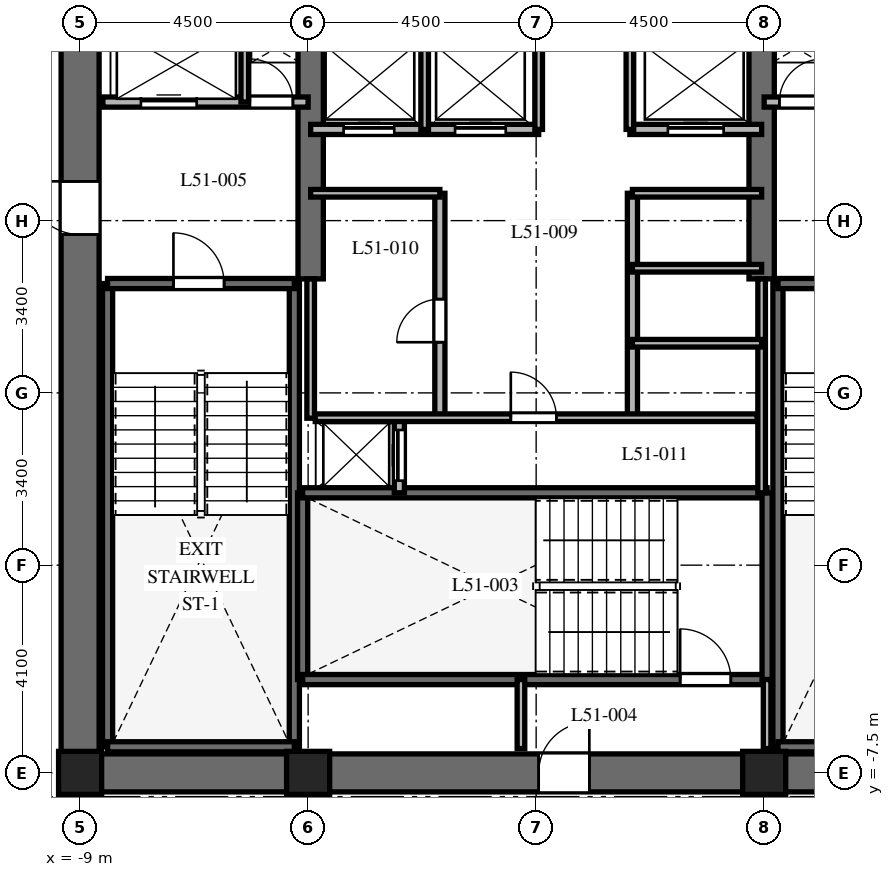
"""IFC4 building model, lengths in metres.
Left out: names, types, materials, properties, quantities, classifications, styles, units other than length and angle.
Written with IfcOpenShell. Run it as: python <this file> out.ifc"""

import sys

from ifc_helpers import new_model, si_unit, direction, frame, frame_2d, origin, origin_2d, place, context, subcontext, project, spatial, rectangle, extrude, element, fill, save


model = new_model("IFC4")
c1 = context("Model", 3, precision=1e-05, world=origin(), true_north=direction((0.0, 1.0)))
c2 = subcontext(c1, "Body", "Model", "MODEL_VIEW")
j1 = project(units=[si_unit("LENGTHUNIT", "METRE"), si_unit("PLANEANGLEUNIT", "RADIAN")], contexts=[c1])
p1 = place(None, origin())
s1 = spatial("IfcSite", under=j1, at=p1, CompositionType="ELEMENT")
p2 = place(p1, origin())
s2 = spatial("IfcBuilding", under=s1, at=p2, CompositionType="ELEMENT")
p3 = place(p2, frame((0.0, 0.0, 206.5)))
s3 = spatial("IfcBuildingStorey", under=s2, at=p3, CompositionType="ELEMENT", Elevation=206.5)
p4 = place(p3, frame((-9.375, -7.5, 0.0), z_axis=(0.0, 0.0, 1.0), x_axis=(1.0, 0.0, 0.0)))
e1 = element("IfcWall", 1, at=p4, inside=s3, PredefinedType="SHEAR", context=c2, shape_type="SweptSolid", body=[
    extrude(rectangle(XDim=18.75, YDim=0.75, at=frame_2d((9.375, 0.0))), origin(), (0.0, 0.0, 1.0), 3.8),
])
p5 = place(p4, frame((9.425, 0.0, 0.0)))
e2 = element("IfcOpeningElement", 2, at=p5, cuts=e1, PredefinedType="OPENING", context=c2, shape_type="SweptSolid", body=[
    extrude(rectangle(XDim=1.0, YDim=2.15, at=frame_2d((0.5, 1.075))), frame((0.0, 0.385, 0.0), z_axis=(0.0, -1.0, 0.0), x_axis=(1.0, 0.0, 0.0)), (0.0, 0.0, 1.0), 0.77),
])
p6 = place(p3, frame((-9.0, -7.125, 0.0), z_axis=(0.0, 0.0, 1.0), x_axis=(0.0, 1.0, 0.0)))
e3 = element("IfcWall", 3, at=p6, inside=s3, PredefinedType="SHEAR", context=c2, shape_type="SweptSolid", body=[
    extrude(rectangle(XDim=14.25, YDim=0.75, at=frame_2d((7.125, 0.0))), origin(), (0.0, 0.0, 1.0), 3.8),
])
p7 = place(p6, frame((10.25, 0.0, 0.0)))
e4 = element("IfcOpeningElement", 4, at=p7, cuts=e3, PredefinedType="OPENING", context=c2, shape_type="SweptSolid", body=[
    extrude(rectangle(XDim=1.05, YDim=2.15, at=frame_2d((0.525, 1.075))), frame((0.0, 0.385, 0.0), z_axis=(0.0, -1.0, 0.0), x_axis=(1.0, 0.0, 0.0)), (0.0, 0.0, 1.0), 0.77),
])
for number, where, z_axis, x_axis in (
    (5, (-4.45, 2.25, 0.0), (0.0, 0.0, 1.0), (0.0, 1.0, 0.0)),
    (6, (4.45, 2.25, 0.0), (0.0, 0.0, 1.0), (0.0, 1.0, 0.0)),
):
    element("IfcWall", number, at=place(p3, frame(where, z_axis=z_axis, x_axis=x_axis)), inside=s3, PredefinedType="SHEAR", context=c2, shape_type="SweptSolid", body=[
        extrude(rectangle(XDim=4.875, YDim=0.5, at=frame_2d((2.438, 0.0))), origin(), (0.0, 0.0, 1.0), 3.8),
    ])
for number, where, z_axis, x_axis in (
    (7, (-8.458, -6.985, 0.0), (0.0, 0.0, 1.0), (0.0, 1.0, 0.0)),
    (8, (-4.772, -6.985, 0.0), (0.0, 0.0, 1.0), (0.0, 1.0, 0.0)),
):
    element("IfcWall", number, at=place(p3, frame(where, z_axis=z_axis, x_axis=x_axis)), inside=s3, PredefinedType="SHEAR", context=c2, shape_type="SweptSolid", body=[
        extrude(rectangle(XDim=9.143, YDim=0.2, at=frame_2d((4.572, 0.0))), origin(), (0.0, 0.0, 1.0), 3.8),
    ])
p8 = place(p3, frame((-8.458, -6.985, 0.0), z_axis=(0.0, 0.0, 1.0), x_axis=(1.0, 0.0, 0.0)))
e9 = element("IfcWall", 9, at=p8, inside=s3, PredefinedType="SHEAR", context=c2, shape_type="SweptSolid", body=[
    extrude(rectangle(XDim=3.686, YDim=0.2, at=frame_2d((1.843, 0.0))), origin(), (0.0, 0.0, 1.0), 3.8),
])
p9 = place(p3, frame((-8.458, 2.158, 0.0), z_axis=(0.0, 0.0, 1.0), x_axis=(1.0, 0.0, 0.0)))
e10 = element("IfcWall", 10, at=p9, inside=s3, PredefinedType="SHEAR", context=c2, shape_type="SweptSolid", body=[
    extrude(rectangle(XDim=3.686, YDim=0.2, at=frame_2d((1.843, 0.0))), origin(), (0.0, 0.0, 1.0), 3.8),
])
p10 = place(p9, frame((1.3, 0.0, 0.0)))
e11 = element("IfcOpeningElement", 11, at=p10, cuts=e10, PredefinedType="OPENING", context=c2, shape_type="SweptSolid", body=[
    extrude(rectangle(XDim=1.0, YDim=2.15, at=frame_2d((0.5, 1.075))), frame((0.0, 0.11, 0.0), z_axis=(0.0, -1.0, 0.0), x_axis=(1.0, 0.0, 0.0)), (0.0, 0.0, 1.0), 0.22),
])
p11 = place(p3, frame((4.772, -6.985, 0.0), z_axis=(0.0, 0.0, 1.0), x_axis=(0.0, 1.0, 0.0)))
e12 = element("IfcWall", 12, at=p11, inside=s3, PredefinedType="SHEAR", context=c2, shape_type="SweptSolid", body=[
    extrude(rectangle(XDim=9.143, YDim=0.2, at=frame_2d((4.572, 0.0))), origin(), (0.0, 0.0, 1.0), 3.8),
])
p12 = place(p3, frame((4.772, -6.985, 0.0), z_axis=(0.0, 0.0, 1.0), x_axis=(1.0, 0.0, 0.0)))
e13 = element("IfcWall", 13, at=p12, inside=s3, PredefinedType="SHEAR", context=c2, shape_type="SweptSolid", body=[
    extrude(rectangle(XDim=3.686, YDim=0.2, at=frame_2d((1.843, 0.0))), origin(), (0.0, 0.0, 1.0), 3.8),
])
p13 = place(p3, frame((4.772, 2.158, 0.0), z_axis=(0.0, 0.0, 1.0), x_axis=(1.0, 0.0, 0.0)))
e14 = element("IfcWall", 14, at=p13, inside=s3, PredefinedType="SHEAR", context=c2, shape_type="SweptSolid", body=[
    extrude(rectangle(XDim=3.686, YDim=0.2, at=frame_2d((1.843, 0.0))), origin(), (0.0, 0.0, 1.0), 3.8),
])
p14 = place(p13, frame((1.35, 0.0, 0.0)))
e15 = element("IfcOpeningElement", 15, at=p14, cuts=e14, PredefinedType="OPENING", context=c2, shape_type="SweptSolid", body=[
    extrude(rectangle(XDim=1.0, YDim=2.15, at=frame_2d((0.5, 1.075))), frame((0.0, 0.11, 0.0), z_axis=(0.0, -1.0, 0.0), x_axis=(1.0, 0.0, 0.0)), (0.0, 0.0, 1.0), 0.22),
])
p15 = place(p3, frame((-4.608, -5.658, 0.0), z_axis=(0.0, 0.0, 1.0), x_axis=(0.0, 1.0, 0.0)))
e16 = element("IfcWall", 16, at=p15, inside=s3, PredefinedType="SHEAR", context=c2, shape_type="SweptSolid", body=[
    extrude(rectangle(XDim=3.686, YDim=0.2, at=frame_2d((1.843, 0.0))), origin(), (0.0, 0.0, 1.0), 3.8),
])
p16 = place(p3, frame((-4.608, -5.658, 0.0), z_axis=(0.0, 0.0, 1.0), x_axis=(1.0, 0.0, 0.0)))
e17 = element("IfcWall", 17, at=p16, inside=s3, PredefinedType="SHEAR", context=c2, shape_type="SweptSolid", body=[
    extrude(rectangle(XDim=9.166, YDim=0.2, at=frame_2d((4.583, 0.0))), origin(), (0.0, 0.0, 1.0), 3.8),
])
p17 = place(p16, frame((7.45, 0.0, 0.0)))
e18 = element("IfcOpeningElement", 18, at=p17, cuts=e17, PredefinedType="OPENING", context=c2, shape_type="SweptSolid", body=[
    extrude(rectangle(XDim=1.0, YDim=2.15, at=frame_2d((0.5, 1.075))), frame((0.0, 0.11, 0.0), z_axis=(0.0, -1.0, 0.0), x_axis=(1.0, 0.0, 0.0)), (0.0, 0.0, 1.0), 0.22),
])
p18 = place(p3, frame((-4.608, -1.972, 0.0), z_axis=(0.0, 0.0, 1.0), x_axis=(1.0, 0.0, 0.0)))
e19 = element("IfcWall", 19, at=p18, inside=s3, PredefinedType="SHEAR", context=c2, shape_type="SweptSolid", body=[
    extrude(rectangle(XDim=9.166, YDim=0.2, at=frame_2d((4.583, 0.0))), origin(), (0.0, 0.0, 1.0), 3.8),
])
p19 = place(p3, frame((4.558, -5.658, 0.0), z_axis=(0.0, 0.0, 1.0), x_axis=(0.0, 1.0, 0.0)))
e20 = element("IfcWall", 20, at=p19, inside=s3, PredefinedType="SHEAR", context=c2, shape_type="SweptSolid", body=[
    extrude(rectangle(XDim=3.686, YDim=0.2, at=frame_2d((1.843, 0.0))), origin(), (0.0, 0.0, 1.0), 3.8),
])
for number, where, z_axis, x_axis in (
    (21, (-9.0, -7.5, 0.0), (0.0, 0.0, 1.0), (1.0, 0.0, 0.0)),
    (22, (-4.5, -7.5, 0.0), (0.0, 0.0, 1.0), (1.0, 0.0, 0.0)),
    (23, (4.5, -7.5, 0.0), (0.0, 0.0, 1.0), (1.0, 0.0, 0.0)),
):
    element("IfcColumn", number, at=place(p3, frame(where, z_axis=z_axis, x_axis=x_axis)), inside=s3, PredefinedType="COLUMN", context=c2, shape_type="SweptSolid", body=[
        extrude(rectangle(XDim=0.85, YDim=0.85, at=origin_2d()), origin(), (0.0, 0.0, 1.0), 3.8),
    ])
for number, where, z_axis, x_axis in (
    (24, (-0.3, -7.02, 0.0), (0.0, 0.0, 1.0), (0.0, 1.0, 0.0)),
    (25, (4.558, -7.02, 0.0), (0.0, 0.0, 1.0), (0.0, 1.0, 0.0)),
):
    element("IfcWall", number, at=place(p3, frame(where, z_axis=z_axis, x_axis=x_axis)), inside=s3, PredefinedType="PARTITIONING", context=c2, shape_type="SweptSolid", body=[
        extrude(rectangle(XDim=1.362, YDim=0.15, at=frame_2d((0.681, 0.0))), origin(), (0.0, 0.0, 1.0), 3.5),
    ])
p20 = place(p3, frame((-8.55, 5.74, 0.0), z_axis=(0.0, 0.0, 1.0), x_axis=(1.0, 0.0, 0.0)))
e26 = element("IfcWall", 26, at=p20, inside=s3, PredefinedType="PARTITIONING", context=c2, shape_type="SweptSolid", body=[
    extrude(rectangle(XDim=4.05, YDim=0.2, at=frame_2d((2.025, 0.0))), origin(), (0.0, 0.0, 1.0), 3.5),
])
p21 = place(p20, frame((0.75, 0.0, 0.0)))
e27 = element("IfcOpeningElement", 27, at=p21, cuts=e26, PredefinedType="OPENING", context=c2, shape_type="SweptSolid", body=[
    extrude(rectangle(XDim=1.1, YDim=2.2, at=frame_2d((0.55, 1.1))), frame((0.0, 0.11, 0.0), z_axis=(0.0, -1.0, 0.0), x_axis=(1.0, 0.0, 0.0)), (0.0, 0.0, 1.0), 0.22),
])
p22 = place(p20, frame((2.9, 0.0, 0.0)))
e28 = element("IfcOpeningElement", 28, at=p22, cuts=e26, PredefinedType="OPENING", context=c2, shape_type="SweptSolid", body=[
    extrude(rectangle(XDim=0.85, YDim=2.03, at=frame_2d((0.425, 1.015))), frame((0.0, 0.11, 0.0), z_axis=(0.0, -1.0, 0.0), x_axis=(1.0, 0.0, 0.0)), (0.0, 0.0, 1.0), 0.22),
])
p23 = place(p3, frame((-5.75, 5.74, 0.0), z_axis=(0.0, 0.0, 1.0), x_axis=(0.0, 1.0, 0.0)))
e29 = element("IfcWall", 29, at=p23, inside=s3, PredefinedType="PARTITIONING", context=c2, shape_type="SweptSolid", body=[
    extrude(rectangle(XDim=1.41, YDim=0.15, at=frame_2d((0.705, 0.0))), origin(), (0.0, 0.0, 1.0), 3.5),
])
p24 = place(p3, frame((4.5, 5.74, 0.0), z_axis=(0.0, 0.0, 1.0), x_axis=(1.0, 0.0, 0.0)))
e30 = element("IfcWall", 30, at=p24, inside=s3, PredefinedType="PARTITIONING", context=c2, shape_type="SweptSolid", body=[
    extrude(rectangle(XDim=4.05, YDim=0.2, at=frame_2d((2.025, 0.0))), origin(), (0.0, 0.0, 1.0), 3.5),
])
p25 = place(p24, frame((0.3, 0.0, 0.0)))
e31 = element("IfcOpeningElement", 31, at=p25, cuts=e30, PredefinedType="OPENING", context=c2, shape_type="SweptSolid", body=[
    extrude(rectangle(XDim=0.85, YDim=2.03, at=frame_2d((0.425, 1.015))), frame((0.0, 0.11, 0.0), z_axis=(0.0, -1.0, 0.0), x_axis=(1.0, 0.0, 0.0)), (0.0, 0.0, 1.0), 0.22),
])
p26 = place(p24, frame((2.15, 0.0, 0.0)))
e32 = element("IfcOpeningElement", 32, at=p26, cuts=e30, PredefinedType="OPENING", context=c2, shape_type="SweptSolid", body=[
    extrude(rectangle(XDim=1.1, YDim=2.2, at=frame_2d((0.55, 1.1))), frame((0.0, 0.11, 0.0), z_axis=(0.0, -1.0, 0.0), x_axis=(1.0, 0.0, 0.0)), (0.0, 0.0, 1.0), 0.22),
])
p27 = place(p3, frame((-2.7, -1.972, 0.0), z_axis=(0.0, 0.0, 1.0), x_axis=(0.0, 1.0, 0.0)))
e33 = element("IfcWall", 33, at=p27, inside=s3, PredefinedType="PARTITIONING", context=c2, shape_type="SweptSolid", body=[
    extrude(rectangle(XDim=1.472, YDim=0.2, at=frame_2d((0.736, 0.0))), origin(), (0.0, 0.0, 1.0), 3.5),
])
p28 = place(p27, frame((0.24, 0.0, 0.0)))
e34 = element("IfcOpeningElement", 34, at=p28, cuts=e33, PredefinedType="OPENING", context=c2, shape_type="SweptSolid", body=[
    extrude(rectangle(XDim=1.0, YDim=2.2, at=frame_2d((0.5, 1.1))), frame((0.0, 0.11, 0.0), z_axis=(0.0, -1.0, 0.0), x_axis=(1.0, 0.0, 0.0)), (0.0, 0.0, 1.0), 0.22),
])
p29 = place(p3, frame((-4.45, 5.2, 0.0), z_axis=(0.0, 0.0, 1.0), x_axis=(1.0, 0.0, 0.0)))
e35 = element("IfcWall", 35, at=p29, inside=s3, PredefinedType="PARTITIONING", context=c2, shape_type="SweptSolid", body=[
    extrude(rectangle(XDim=4.5, YDim=0.2, at=frame_2d((2.25, 0.0))), origin(), (0.0, 0.0, 1.0), 3.5),
])
p30 = place(p29, frame((0.65, 0.0, 0.0)))
e36 = element("IfcOpeningElement", 36, at=p30, cuts=e35, PredefinedType="OPENING", context=c2, shape_type="SweptSolid", body=[
    extrude(rectangle(XDim=1.0, YDim=2.2, at=frame_2d((0.5, 1.1))), frame((0.0, 0.11, 0.0), z_axis=(0.0, -1.0, 0.0), x_axis=(1.0, 0.0, 0.0)), (0.0, 0.0, 1.0), 0.22),
])
p31 = place(p29, frame((2.85, 0.0, 0.0)))
e37 = element("IfcOpeningElement", 37, at=p31, cuts=e35, PredefinedType="OPENING", context=c2, shape_type="SweptSolid", body=[
    extrude(rectangle(XDim=1.0, YDim=2.2, at=frame_2d((0.5, 1.1))), frame((0.0, 0.11, 0.0), z_axis=(0.0, -1.0, 0.0), x_axis=(1.0, 0.0, 0.0)), (0.0, 0.0, 1.0), 0.22),
])
p32 = place(p3, frame((1.85, 5.2, 0.0), z_axis=(0.0, 0.0, 1.0), x_axis=(1.0, 0.0, 0.0)))
e38 = element("IfcWall", 38, at=p32, inside=s3, PredefinedType="PARTITIONING", context=c2, shape_type="SweptSolid", body=[
    extrude(rectangle(XDim=2.6, YDim=0.2, at=frame_2d((1.3, 0.0))), origin(), (0.0, 0.0, 1.0), 3.5),
])
p33 = place(p32, frame((0.75, 0.0, 0.0)))
e39 = element("IfcOpeningElement", 39, at=p33, cuts=e38, PredefinedType="OPENING", context=c2, shape_type="SweptSolid", body=[
    extrude(rectangle(XDim=1.1, YDim=2.2, at=frame_2d((0.55, 1.1))), frame((0.0, 0.11, 0.0), z_axis=(0.0, -1.0, 0.0), x_axis=(1.0, 0.0, 0.0)), (0.0, 0.0, 1.0), 0.22),
])
p34 = place(p3, frame((-2.2, 5.2, 0.0), z_axis=(0.0, 0.0, 1.0), x_axis=(0.0, 1.0, 0.0)))
e40 = element("IfcWall", 40, at=p34, inside=s3, PredefinedType="PARTITIONING", context=c2, shape_type="SweptSolid", body=[
    extrude(rectangle(XDim=1.85, YDim=0.15, at=frame_2d((0.925, 0.0))), origin(), (0.0, 0.0, 1.0), 3.5),
])
for number, where, z_axis, x_axis in (
    (41, (0.05, 5.2, 0.0), (0.0, 0.0, 1.0), (0.0, 1.0, 0.0)),
    (42, (1.85, 5.2, 0.0), (0.0, 0.0, 1.0), (0.0, 1.0, 0.0)),
):
    element("IfcWall", number, at=place(p3, frame(where, z_axis=z_axis, x_axis=x_axis)), inside=s3, PredefinedType="PARTITIONING", context=c2, shape_type="SweptSolid", body=[
        extrude(rectangle(XDim=1.95, YDim=0.15, at=frame_2d((0.975, 0.0))), origin(), (0.0, 0.0, 1.0), 3.5),
    ])
p35 = place(p3, frame((-4.45, -0.5, 0.0), z_axis=(0.0, 0.0, 1.0), x_axis=(0.0, 1.0, 0.0)))
e43 = element("IfcWall", 43, at=p35, inside=s3, PredefinedType="PARTITIONING", context=c2, shape_type="SweptSolid", body=[
    extrude(rectangle(XDim=2.75, YDim=0.15, at=frame_2d((1.375, 0.0))), origin(), (0.0, 0.0, 1.0), 3.5),
])
p36 = place(p3, frame((4.45, -1.972, 0.0), z_axis=(0.0, 0.0, 1.0), x_axis=(0.0, 1.0, 0.0)))
e44 = element("IfcWall", 44, at=p36, inside=s3, PredefinedType="PARTITIONING", context=c2, shape_type="SweptSolid", body=[
    extrude(rectangle(XDim=4.222, YDim=0.15, at=frame_2d((2.111, 0.0))), origin(), (0.0, 0.0, 1.0), 3.5),
])
p37 = place(p3, frame((-1.9, -0.5, 0.0), z_axis=(0.0, 0.0, 1.0), x_axis=(0.0, 1.0, 0.0)))
e45 = element("IfcWall", 45, at=p37, inside=s3, PredefinedType="PARTITIONING", context=c2, shape_type="SweptSolid", body=[
    extrude(rectangle(XDim=4.44, YDim=0.2, at=frame_2d((2.22, 0.0))), origin(), (0.0, 0.0, 1.0), 3.5),
])
p38 = place(p37, frame((1.5, 0.0, 0.0)))
e46 = element("IfcOpeningElement", 46, at=p38, cuts=e45, PredefinedType="OPENING", context=c2, shape_type="SweptSolid", body=[
    extrude(rectangle(XDim=0.85, YDim=2.03, at=frame_2d((0.425, 1.015))), frame((0.0, 0.11, 0.0), z_axis=(0.0, -1.0, 0.0), x_axis=(1.0, 0.0, 0.0)), (0.0, 0.0, 1.0), 0.22),
])
p39 = place(p3, frame((-4.45, 3.94, 0.0), z_axis=(0.0, 0.0, 1.0), x_axis=(1.0, 0.0, 0.0)))
e47 = element("IfcWall", 47, at=p39, inside=s3, PredefinedType="PARTITIONING", context=c2, shape_type="SweptSolid", body=[
    extrude(rectangle(XDim=2.55, YDim=0.15, at=frame_2d((1.275, 0.0))), origin(), (0.0, 0.0, 1.0), 3.5),
])
p40 = place(p3, frame((1.9, -0.5, 0.0), z_axis=(0.0, 0.0, 1.0), x_axis=(0.0, 1.0, 0.0)))
e48 = element("IfcWall", 48, at=p40, inside=s3, PredefinedType="PARTITIONING", context=c2, shape_type="SweptSolid", body=[
    extrude(rectangle(XDim=4.44, YDim=0.2, at=frame_2d((2.22, 0.0))), origin(), (0.0, 0.0, 1.0), 3.5),
])
for number, where, z_axis, x_axis in (
    (49, (1.9, 3.94, 0.0), (0.0, 0.0, 1.0), (1.0, 0.0, 0.0)),
    (50, (1.9, 0.98, 0.0), (0.0, 0.0, 1.0), (1.0, 0.0, 0.0)),
    (51, (1.9, 2.46, 0.0), (0.0, 0.0, 1.0), (1.0, 0.0, 0.0)),
):
    element("IfcWall", number, at=place(p3, frame(where, z_axis=z_axis, x_axis=x_axis)), inside=s3, PredefinedType="PARTITIONING", context=c2, shape_type="SweptSolid", body=[
        extrude(rectangle(XDim=2.55, YDim=0.15, at=frame_2d((1.275, 0.0))), origin(), (0.0, 0.0, 1.0), 3.5),
    ])
p41 = place(p3, frame((-4.36, -0.49, 0.0), z_axis=(0.0, 0.0, 1.0), x_axis=(1.0, 0.0, 0.0)))
e52 = element("IfcWall", 52, at=p41, inside=s3, PredefinedType="PARTITIONING", context=c2, shape_type="SweptSolid", body=[
    extrude(rectangle(XDim=8.72, YDim=0.15, at=frame_2d((4.36, 0.0))), origin(), (0.0, 0.0, 1.0), 3.5),
])
p42 = place(p41, frame((3.86, 0.0, 0.0)))
e53 = element("IfcOpeningElement", 53, at=p42, cuts=e52, PredefinedType="OPENING", context=c2, shape_type="SweptSolid", body=[
    extrude(rectangle(XDim=0.9, YDim=2.03, at=frame_2d((0.45, 1.015))), frame((0.0, 0.085, 0.0), z_axis=(0.0, -1.0, 0.0), x_axis=(1.0, 0.0, 0.0)), (0.0, 0.0, 1.0), 0.17),
])
p43 = place(p10, origin())
e54 = element("IfcDoor", 54, at=p43, inside=s3, OperationType="SINGLE_SWING_LEFT", PredefinedType="DOOR", context=c2, shape_type="SweptSolid", body=[
    extrude(rectangle(XDim=1.0, YDim=2.15, at=frame_2d((0.5, 1.075))), frame((0.0, 0.025, 0.0), z_axis=(0.0, -1.0, 0.0), x_axis=(1.0, 0.0, 0.0)), (0.0, 0.0, 1.0), 0.05),
])
fill(e11, e54)
p44 = place(p17, origin())
e55 = element("IfcDoor", 55, at=p44, inside=s3, OperationType="SINGLE_SWING_LEFT", PredefinedType="DOOR", context=c2, shape_type="SweptSolid", body=[
    extrude(rectangle(XDim=1.0, YDim=2.15, at=frame_2d((0.5, 1.075))), frame((0.0, 0.025, 0.0), z_axis=(0.0, -1.0, 0.0), x_axis=(1.0, 0.0, 0.0)), (0.0, 0.0, 1.0), 0.05),
])
fill(e18, e55)
p45 = place(p5, origin())
e56 = element("IfcDoor", 56, at=p45, inside=s3, OperationType="SINGLE_SWING_RIGHT", PredefinedType="DOOR", context=c2, shape_type="SweptSolid", body=[
    extrude(rectangle(XDim=1.0, YDim=2.15, at=frame_2d((0.5, 1.075))), frame((0.0, 0.025, 0.0), z_axis=(0.0, -1.0, 0.0), x_axis=(1.0, 0.0, 0.0)), (0.0, 0.0, 1.0), 0.05),
])
fill(e2, e56)
p46 = place(p7, origin())
e57 = element("IfcDoor", 57, at=p46, inside=s3, OperationType="SINGLE_SWING_RIGHT", PredefinedType="DOOR", context=c2, shape_type="SweptSolid", body=[
    extrude(rectangle(XDim=1.05, YDim=2.15, at=frame_2d((0.525, 1.075))), frame((0.0, 0.025, 0.0), z_axis=(0.0, -1.0, 0.0), x_axis=(1.0, 0.0, 0.0)), (0.0, 0.0, 1.0), 0.05),
])
fill(e4, e57)
p47 = place(p21, origin())
e58 = element("IfcDoor", 58, at=p47, inside=s3, OperationType="SLIDING_TO_LEFT", PredefinedType="DOOR", context=c2, shape_type="SweptSolid", body=[
    extrude(rectangle(XDim=1.1, YDim=2.2, at=frame_2d((0.55, 1.1))), frame((0.0, 0.025, 0.0), z_axis=(0.0, -1.0, 0.0), x_axis=(1.0, 0.0, 0.0)), (0.0, 0.0, 1.0), 0.05),
])
fill(e27, e58)
p48 = place(p22, origin())
e59 = element("IfcDoor", 59, at=p48, inside=s3, OperationType="SINGLE_SWING_LEFT", PredefinedType="DOOR", context=c2, shape_type="SweptSolid", body=[
    extrude(rectangle(XDim=0.85, YDim=2.03, at=frame_2d((0.425, 1.015))), frame((0.0, 0.025, 0.0), z_axis=(0.0, -1.0, 0.0), x_axis=(1.0, 0.0, 0.0)), (0.0, 0.0, 1.0), 0.05),
])
fill(e28, e59)
p49 = place(p25, origin())
e60 = element("IfcDoor", 60, at=p49, inside=s3, OperationType="SINGLE_SWING_RIGHT", PredefinedType="DOOR", context=c2, shape_type="SweptSolid", body=[
    extrude(rectangle(XDim=0.85, YDim=2.03, at=frame_2d((0.425, 1.015))), frame((0.0, 0.025, 0.0), z_axis=(0.0, -1.0, 0.0), x_axis=(1.0, 0.0, 0.0)), (0.0, 0.0, 1.0), 0.05),
])
fill(e31, e60)
p50 = place(p28, origin())
e61 = element("IfcDoor", 61, at=p50, inside=s3, OperationType="SLIDING_TO_LEFT", PredefinedType="DOOR", context=c2, shape_type="SweptSolid", body=[
    extrude(rectangle(XDim=1.0, YDim=2.2, at=frame_2d((0.5, 1.1))), frame((0.0, 0.025, 0.0), z_axis=(0.0, -1.0, 0.0), x_axis=(1.0, 0.0, 0.0)), (0.0, 0.0, 1.0), 0.05),
])
fill(e34, e61)
p51 = place(p30, origin())
e62 = element("IfcDoor", 62, at=p51, inside=s3, OperationType="SLIDING_TO_LEFT", PredefinedType="DOOR", context=c2, shape_type="SweptSolid", body=[
    extrude(rectangle(XDim=1.0, YDim=2.2, at=frame_2d((0.5, 1.1))), frame((0.0, 0.025, 0.0), z_axis=(0.0, -1.0, 0.0), x_axis=(1.0, 0.0, 0.0)), (0.0, 0.0, 1.0), 0.05),
])
fill(e36, e62)
p52 = place(p31, origin())
e63 = element("IfcDoor", 63, at=p52, inside=s3, OperationType="SLIDING_TO_RIGHT", PredefinedType="DOOR", context=c2, shape_type="SweptSolid", body=[
    extrude(rectangle(XDim=1.0, YDim=2.2, at=frame_2d((0.5, 1.1))), frame((0.0, 0.025, 0.0), z_axis=(0.0, -1.0, 0.0), x_axis=(1.0, 0.0, 0.0)), (0.0, 0.0, 1.0), 0.05),
])
fill(e37, e63)
p53 = place(p33, origin())
e64 = element("IfcDoor", 64, at=p53, inside=s3, OperationType="SLIDING_TO_RIGHT", PredefinedType="DOOR", context=c2, shape_type="SweptSolid", body=[
    extrude(rectangle(XDim=1.1, YDim=2.2, at=frame_2d((0.55, 1.1))), frame((0.0, 0.025, 0.0), z_axis=(0.0, -1.0, 0.0), x_axis=(1.0, 0.0, 0.0)), (0.0, 0.0, 1.0), 0.05),
])
fill(e39, e64)
p54 = place(p38, origin())
e65 = element("IfcDoor", 65, at=p54, inside=s3, OperationType="SINGLE_SWING_LEFT", PredefinedType="DOOR", context=c2, shape_type="SweptSolid", body=[
    extrude(rectangle(XDim=0.85, YDim=2.03, at=frame_2d((0.425, 1.015))), frame((0.0, 0.025, 0.0), z_axis=(0.0, -1.0, 0.0), x_axis=(1.0, 0.0, 0.0)), (0.0, 0.0, 1.0), 0.05),
])
fill(e46, e65)
p55 = place(p42, origin())
e66 = element("IfcDoor", 66, at=p55, inside=s3, OperationType="SINGLE_SWING_LEFT", PredefinedType="DOOR", context=c2, shape_type="SweptSolid", body=[
    extrude(rectangle(XDim=0.9, YDim=2.03, at=frame_2d((0.45, 1.015))), frame((0.0, 0.025, 0.0), z_axis=(0.0, -1.0, 0.0), x_axis=(1.0, 0.0, 0.0)), (0.0, 0.0, 1.0), 0.05),
])
fill(e53, e66)
save(model, sys.argv[1])
